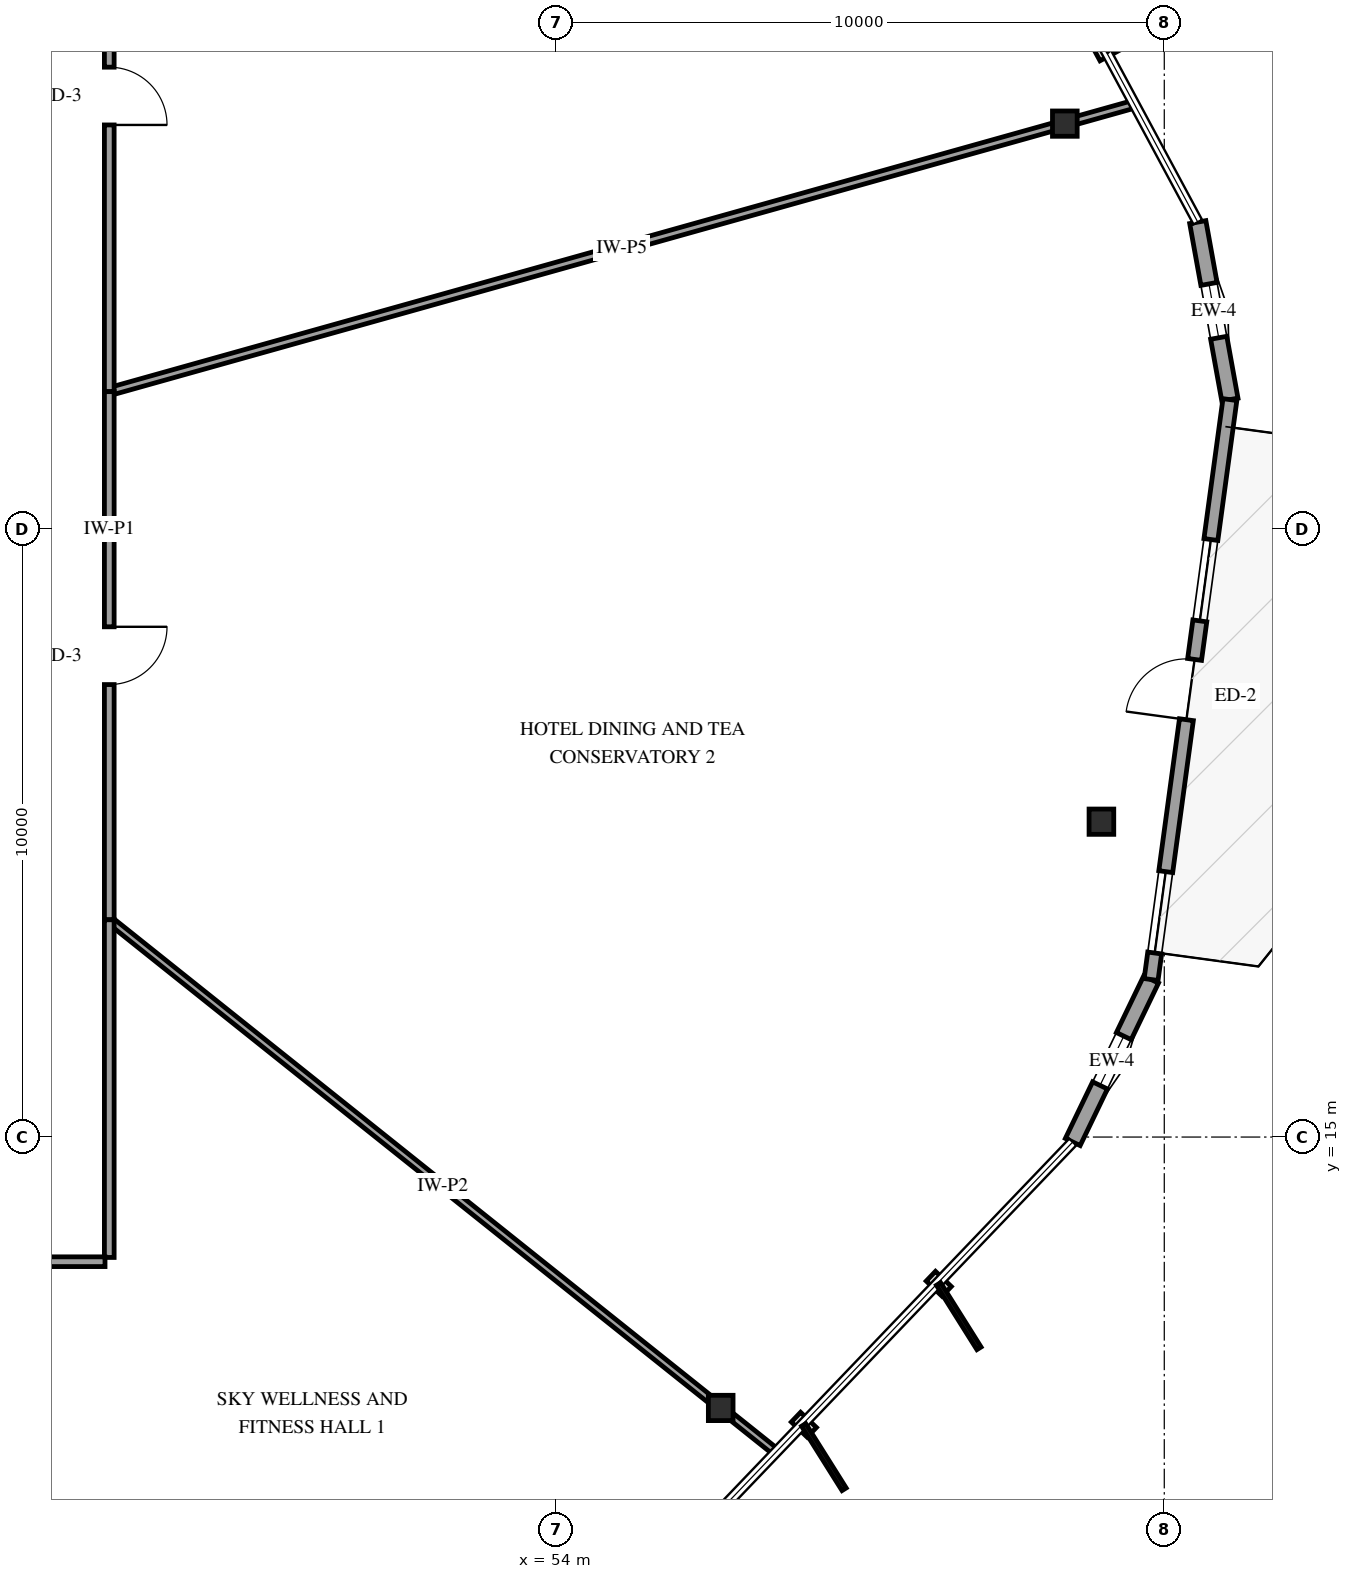
"""IFC4 building model, lengths in metres.
Left out: names, types, materials, properties, quantities, classifications, styles, units other than length and angle.
Written with IfcOpenShell. Run it as: python <this file> out.ifc"""

import sys

from ifc_helpers import new_model, si_unit, direction, frame, frame_2d, origin, origin_2d, place, context, subcontext, project, spatial, rectangle, i_section, extrude, element, fill, save


model = new_model("IFC4")
c1 = context("Model", 3, precision=1e-05, world=origin(), true_north=direction((0.0, 1.0)))
c2 = subcontext(c1, "Body", "Model", "MODEL_VIEW")
j1 = project(units=[si_unit("LENGTHUNIT", "METRE"), si_unit("PLANEANGLEUNIT", "RADIAN")], contexts=[c1])
p1 = place(None, origin())
s1 = spatial("IfcSite", under=j1, at=p1, CompositionType="ELEMENT")
p2 = place(p1, origin())
s2 = spatial("IfcBuilding", under=s1, at=p2, CompositionType="ELEMENT")
p3 = place(p2, frame((0.0, 0.0, 208.6)))
s3 = spatial("IfcBuildingStorey", under=s2, at=p3, CompositionType="ELEMENT", Elevation=208.6)
for number, where, z_axis, x_axis in (
    (1, (62.365, 31.666, 0.0), (0.0, 0.0, 1.0), (1.0, 0.0, 0.0)),
    (2, (56.705, 10.545, 0.0), (0.0, 0.0, 1.0), (1.0, 0.0, 0.0)),
    (3, (62.966, 20.186, 0.0), (0.0, 0.0, 1.0), (1.0, 0.0, 0.0)),
):
    element("IfcColumn", number, at=place(p3, frame(where, z_axis=z_axis, x_axis=x_axis)), inside=s3, PredefinedType="COLUMN", context=c2, shape_type="SweptSolid", body=[
        extrude(i_section(OverallWidth=0.406, OverallDepth=0.416, WebThickness=0.03, FlangeThickness=0.048, FilletRadius=0.038, at=origin_2d()), origin(), (0.0, 0.0, 1.0), 3.6),
    ])
p4 = place(p3, frame((62.495, 14.919, 0.0), z_axis=(0.0, 0.0, 1.0), x_axis=(0.434295608334, 0.900770406142, 0.0)))
e4 = element("IfcWall", 4, at=p4, inside=s3, PredefinedType="SOLIDWALL", context=c2, shape_type="SweptSolid", body=[
    extrude(rectangle(XDim=2.967, YDim=0.27, at=frame_2d((1.483, 0.0))), origin(), (0.0, 0.0, 1.0), 2.679),
])
p5 = place(p4, frame((1.033, 0.0, 0.75)))
e5 = element("IfcOpeningElement", 5, at=p5, cuts=e4, PredefinedType="OPENING", context=c2, shape_type="SweptSolid", body=[
    extrude(rectangle(XDim=0.9, YDim=1.5, at=frame_2d((0.45, 0.75))), frame((0.0, 0.145, 0.0), z_axis=(0.0, -1.0, 0.0), x_axis=(1.0, 0.0, 0.0)), (0.0, 0.0, 1.0), 0.29),
])
p6 = place(p3, frame((65.079, 27.127, 0.0), z_axis=(0.0, 0.0, 1.0), x_axis=(-0.178088753346, 0.984014428721, 0.0)))
e6 = element("IfcWall", 6, at=p6, inside=s3, PredefinedType="SOLIDWALL", context=c2, shape_type="SweptSolid", body=[
    extrude(rectangle(XDim=2.967, YDim=0.27, at=frame_2d((1.483, 0.0))), origin(), (0.0, 0.0, 1.0), 2.679),
])
p7 = place(p6, frame((1.033, 0.0, 0.75)))
e7 = element("IfcOpeningElement", 7, at=p7, cuts=e6, PredefinedType="OPENING", context=c2, shape_type="SweptSolid", body=[
    extrude(rectangle(XDim=0.9, YDim=1.5, at=frame_2d((0.45, 0.75))), frame((0.0, 0.145, 0.0), z_axis=(0.0, -1.0, 0.0), x_axis=(1.0, 0.0, 0.0)), (0.0, 0.0, 1.0), 0.29),
])
p8 = place(p3, frame((63.783, 17.591, 0.0), z_axis=(0.0, 0.0, 1.0), x_axis=(0.134677360418, 0.990889503724, 0.0)))
e8 = element("IfcWall", 8, at=p8, inside=s3, PredefinedType="SOLIDWALL", context=c2, shape_type="SweptSolid", body=[
    extrude(rectangle(XDim=9.624, YDim=0.23, at=frame_2d((4.812, 0.0))), origin(), (0.0, 0.0, 1.0), 2.679),
])
p9 = place(p8, frame((4.312, 0.0, 0.0)))
e9 = element("IfcOpeningElement", 9, at=p9, cuts=e8, PredefinedType="OPENING", context=c2, shape_type="SweptSolid", body=[
    extrude(rectangle(XDim=1.0, YDim=2.15, at=frame_2d((0.5, 1.075))), frame((0.0, 0.125, 0.0), z_axis=(0.0, -1.0, 0.0), x_axis=(1.0, 0.0, 0.0)), (0.0, 0.0, 1.0), 0.25),
])
p10 = place(p8, frame((0.44, 0.0, 0.72)))
e10 = element("IfcOpeningElement", 10, at=p10, cuts=e8, PredefinedType="OPENING", context=c2, shape_type="SweptSolid", body=[
    extrude(rectangle(XDim=1.35, YDim=1.65, at=frame_2d((0.675, 0.825))), frame((0.0, 0.125, 0.0), z_axis=(0.0, -1.0, 0.0), x_axis=(1.0, 0.0, 0.0)), (0.0, 0.0, 1.0), 0.25),
])
p11 = place(p8, frame((5.952, 0.0, 0.72)))
e11 = element("IfcOpeningElement", 11, at=p11, cuts=e8, PredefinedType="OPENING", context=c2, shape_type="SweptSolid", body=[
    extrude(rectangle(XDim=1.35, YDim=1.65, at=frame_2d((0.675, 0.825))), frame((0.0, 0.125, 0.0), z_axis=(0.0, -1.0, 0.0), x_axis=(1.0, 0.0, 0.0)), (0.0, 0.0, 1.0), 0.25),
])
p12 = place(p3, frame((63.508, 31.986, 0.0), z_axis=(0.0, 0.0, 1.0), x_axis=(-0.962849090676, -0.270040049964, 0.0)))
e12 = element("IfcWall", 12, at=p12, inside=s3, PredefinedType="PARTITIONING", context=c2, shape_type="SweptSolid", body=[
    extrude(rectangle(XDim=17.509, YDim=0.13, at=frame_2d((8.754, 0.0))), origin(), (0.0, 0.0, 1.0), 3.3),
])
p13 = place(p3, frame((46.65, 18.573, 0.0), z_axis=(0.0, 0.0, 1.0), x_axis=(0.781499914216, -0.623905348655, 0.0)))
e13 = element("IfcWall", 13, at=p13, inside=s3, PredefinedType="PARTITIONING", context=c2, shape_type="SweptSolid", body=[
    extrude(rectangle(XDim=14.031, YDim=0.12, at=frame_2d((7.015, 0.0))), origin(), (0.0, 0.0, 1.0), 3.3),
])
p14 = place(p3, frame((46.65, 36.98, 0.0), z_axis=(0.0, 0.0, 1.0), x_axis=(0.0, -1.0, 0.0)))
e14 = element("IfcWall", 14, at=p14, inside=s3, PredefinedType="PARTITIONING", context=c2, shape_type="SweptSolid", body=[
    extrude(rectangle(XDim=9.722, YDim=0.16, at=frame_2d((4.861, 0.0))), origin(), (0.0, 0.0, 1.0), 3.3),
])
p15 = place(p14, frame((4.386, 0.0, 0.0)))
e15 = element("IfcOpeningElement", 15, at=p15, cuts=e14, PredefinedType="OPENING", context=c2, shape_type="SweptSolid", body=[
    extrude(rectangle(XDim=0.95, YDim=2.15, at=frame_2d((0.475, 1.075))), frame((0.0, 0.09, 0.0), z_axis=(0.0, -1.0, 0.0), x_axis=(1.0, 0.0, 0.0)), (0.0, 0.0, 1.0), 0.18),
])
p16 = place(p3, frame((46.65, 27.258, 0.0), z_axis=(0.0, 0.0, 1.0), x_axis=(0.0, -1.0, 0.0)))
e16 = element("IfcWall", 16, at=p16, inside=s3, PredefinedType="PARTITIONING", context=c2, shape_type="SweptSolid", body=[
    extrude(rectangle(XDim=8.685, YDim=0.16, at=frame_2d((4.343, 0.0))), origin(), (0.0, 0.0, 1.0), 3.3),
])
p17 = place(p16, frame((3.867, 0.0, 0.0)))
e17 = element("IfcOpeningElement", 17, at=p17, cuts=e16, PredefinedType="OPENING", context=c2, shape_type="SweptSolid", body=[
    extrude(rectangle(XDim=0.95, YDim=2.15, at=frame_2d((0.475, 1.075))), frame((0.0, 0.09, 0.0), z_axis=(0.0, -1.0, 0.0), x_axis=(1.0, 0.0, 0.0)), (0.0, 0.0, 1.0), 0.18),
])
p18 = place(p3, frame((46.65, 18.573, 0.0), z_axis=(0.0, 0.0, 1.0), x_axis=(0.0, -1.0, 0.0)))
e18 = element("IfcWall", 18, at=p18, inside=s3, PredefinedType="PARTITIONING", context=c2, shape_type="SweptSolid", body=[
    extrude(rectangle(XDim=5.553, YDim=0.16, at=frame_2d((2.776, 0.0))), origin(), (0.0, 0.0, 1.0), 3.3),
])
p19 = place(p3, frame((46.58, 12.95, 0.0), z_axis=(0.0, 0.0, 1.0), x_axis=(-1.0, 0.0, 0.0)))
e19 = element("IfcWall", 19, at=p19, inside=s3, PredefinedType="PARTITIONING", context=c2, shape_type="SweptSolid", body=[
    extrude(rectangle(XDim=3.31, YDim=0.16, at=frame_2d((1.655, 0.0))), origin(), (0.0, 0.0, 1.0), 3.3),
])
p20 = place(p5, origin())
e20 = element("IfcWindow", 20, at=p20, inside=s3, PartitioningType="SINGLE_PANEL", PredefinedType="WINDOW", context=c2, shape_type="SweptSolid", body=[
    extrude(rectangle(XDim=0.9, YDim=1.5, at=frame_2d((0.45, 0.75))), frame((0.0, 0.03, 0.0), z_axis=(0.0, -1.0, 0.0), x_axis=(1.0, 0.0, 0.0)), (0.0, 0.0, 1.0), 0.06),
])
fill(e5, e20)
p21 = place(p7, origin())
e21 = element("IfcWindow", 21, at=p21, inside=s3, PartitioningType="SINGLE_PANEL", PredefinedType="WINDOW", context=c2, shape_type="SweptSolid", body=[
    extrude(rectangle(XDim=0.9, YDim=1.5, at=frame_2d((0.45, 0.75))), frame((0.0, 0.03, 0.0), z_axis=(0.0, -1.0, 0.0), x_axis=(1.0, 0.0, 0.0)), (0.0, 0.0, 1.0), 0.06),
])
fill(e7, e21)
p22 = place(p9, origin())
e22 = element("IfcDoor", 22, at=p22, inside=s3, OperationType="SINGLE_SWING_LEFT", PredefinedType="DOOR", context=c2, shape_type="SweptSolid", body=[
    extrude(rectangle(XDim=1.0, YDim=2.15, at=frame_2d((0.5, 1.075))), frame((0.0, 0.025, 0.0), z_axis=(0.0, -1.0, 0.0), x_axis=(1.0, 0.0, 0.0)), (0.0, 0.0, 1.0), 0.05),
])
fill(e9, e22)
p23 = place(p10, origin())
e23 = element("IfcWindow", 23, at=p23, inside=s3, PartitioningType="SINGLE_PANEL", PredefinedType="WINDOW", context=c2, shape_type="SweptSolid", body=[
    extrude(rectangle(XDim=1.35, YDim=1.65, at=frame_2d((0.675, 0.825))), frame((0.0, 0.03, 0.0), z_axis=(0.0, -1.0, 0.0), x_axis=(1.0, 0.0, 0.0)), (0.0, 0.0, 1.0), 0.06),
])
fill(e10, e23)
p24 = place(p11, origin())
e24 = element("IfcWindow", 24, at=p24, inside=s3, PartitioningType="SINGLE_PANEL", PredefinedType="WINDOW", context=c2, shape_type="SweptSolid", body=[
    extrude(rectangle(XDim=1.35, YDim=1.65, at=frame_2d((0.675, 0.825))), frame((0.0, 0.03, 0.0), z_axis=(0.0, -1.0, 0.0), x_axis=(1.0, 0.0, 0.0)), (0.0, 0.0, 1.0), 0.06),
])
fill(e11, e24)
p25 = place(p15, origin())
e25 = element("IfcDoor", 25, at=p25, inside=s3, OperationType="SINGLE_SWING_RIGHT", PredefinedType="DOOR", context=c2, shape_type="SweptSolid", body=[
    extrude(rectangle(XDim=0.95, YDim=2.15, at=frame_2d((0.475, 1.075))), frame((0.0, 0.025, 0.0), z_axis=(0.0, -1.0, 0.0), x_axis=(1.0, 0.0, 0.0)), (0.0, 0.0, 1.0), 0.05),
])
fill(e15, e25)
p26 = place(p17, origin())
e26 = element("IfcDoor", 26, at=p26, inside=s3, OperationType="SINGLE_SWING_LEFT", PredefinedType="DOOR", context=c2, shape_type="SweptSolid", body=[
    extrude(rectangle(XDim=0.95, YDim=2.15, at=frame_2d((0.475, 1.075))), frame((0.0, 0.025, 0.0), z_axis=(0.0, -1.0, 0.0), x_axis=(1.0, 0.0, 0.0)), (0.0, 0.0, 1.0), 0.05),
])
fill(e17, e26)
save(model, sys.argv[1])
